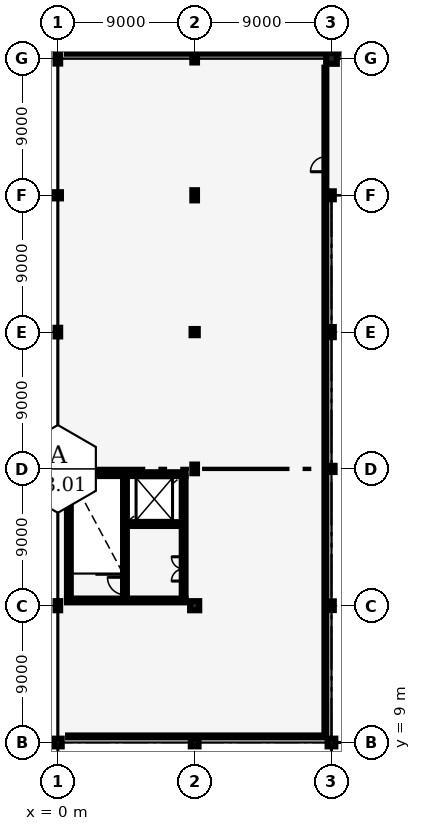
"""IFC4 building model, lengths in metres.
Left out: names, types, materials, properties, quantities, classifications, styles, units other than length and angle.
Written with IfcOpenShell. Run it as: python <this file> out.ifc"""

import sys

from ifc_helpers import new_model, si_unit, direction, frame, frame_2d, origin, origin_2d, place, context, subcontext, project, spatial, rectangle, hollow_circle, i_section, extrude, element, fill, save


model = new_model("IFC4")
c1 = context("Model", 3, precision=1e-05, world=origin(), true_north=direction((0.0, 1.0)))
c2 = subcontext(c1, "Body", "Model", "MODEL_VIEW")
j1 = project(units=[si_unit("LENGTHUNIT", "METRE"), si_unit("PLANEANGLEUNIT", "RADIAN")], contexts=[c1])
p1 = place(None, origin())
s1 = spatial("IfcSite", under=j1, at=p1, CompositionType="ELEMENT")
p2 = place(p1, origin())
s2 = spatial("IfcBuilding", under=s1, at=p2, CompositionType="ELEMENT")
p3 = place(p2, frame((0.0, 0.0, 12.0)))
s3 = spatial("IfcBuildingStorey", under=s2, at=p3, CompositionType="ELEMENT", Elevation=12.0)
p4 = place(p3, frame((0.0, 9.0, 0.0), z_axis=(0.0, 0.0, 1.0), x_axis=(1.0, 0.0, 0.0)))
e1 = element("IfcColumn", 1, at=p4, inside=s3, PredefinedType="COLUMN", context=c2, shape_type="SweptSolid", body=[
    extrude(hollow_circle(Radius=0.254, WallThickness=0.02, at=origin_2d()), origin(), (0.0, 0.0, 1.0), 6.0),
])
p5 = place(p3, frame((0.0, 18.0, 0.0), z_axis=(0.0, 0.0, 1.0), x_axis=(1.0, 0.0, 0.0)))
e2 = element("IfcColumn", 2, at=p5, inside=s3, PredefinedType="COLUMN", context=c2, shape_type="SweptSolid", body=[
    extrude(i_section(OverallWidth=0.3, OverallDepth=0.6, WebThickness=0.015, FlangeThickness=0.03, FilletRadius=0.027, at=origin_2d()), origin(), (0.0, 0.0, 1.0), 6.0),
])
p6 = place(p3, frame((0.0, 27.0, 0.0), z_axis=(0.0, 0.0, 1.0), x_axis=(1.0, 0.0, 0.0)))
e3 = element("IfcColumn", 3, at=p6, inside=s3, PredefinedType="COLUMN", context=c2, shape_type="SweptSolid", body=[
    extrude(rectangle(XDim=0.6, YDim=0.6, at=origin_2d()), origin(), (0.0, 0.0, 1.0), 6.0),
])
p7 = place(p3, frame((0.0, 36.0, 0.0), z_axis=(0.0, 0.0, 1.0), x_axis=(1.0, 0.0, 0.0)))
e4 = element("IfcColumn", 4, at=p7, inside=s3, PredefinedType="COLUMN", context=c2, shape_type="SweptSolid", body=[
    extrude(i_section(OverallWidth=0.306, OverallDepth=0.572, WebThickness=0.021, FlangeThickness=0.04, FilletRadius=0.027, at=origin_2d()), origin(), (0.0, 0.0, 1.0), 6.0),
])
p8 = place(p3, frame((0.0, 45.0, 0.0), z_axis=(0.0, 0.0, 1.0), x_axis=(1.0, 0.0, 0.0)))
e5 = element("IfcColumn", 5, at=p8, inside=s3, PredefinedType="COLUMN", context=c2, shape_type="SweptSolid", body=[
    extrude(hollow_circle(Radius=0.203, WallThickness=0.016, at=origin_2d()), origin(), (0.0, 0.0, 1.0), 6.0),
])
p9 = place(p3, frame((0.0, 54.0, 0.0), z_axis=(0.0, 0.0, 1.0), x_axis=(1.0, 0.0, 0.0)))
e6 = element("IfcColumn", 6, at=p9, inside=s3, PredefinedType="COLUMN", context=c2, shape_type="SweptSolid", body=[
    extrude(i_section(OverallWidth=0.305, OverallDepth=0.668, WebThickness=0.021, FlangeThickness=0.04, FilletRadius=0.027, at=origin_2d()), origin(), (0.0, 0.0, 1.0), 6.0),
])
p10 = place(p3, frame((9.0, 9.0, 0.0), z_axis=(0.0, 0.0, 1.0), x_axis=(1.0, 0.0, 0.0)))
e7 = element("IfcColumn", 7, at=p10, inside=s3, PredefinedType="COLUMN", context=c2, shape_type="SweptSolid", body=[
    extrude(hollow_circle(Radius=0.254, WallThickness=0.02, at=origin_2d()), origin(), (0.0, 0.0, 1.0), 6.0),
])
p11 = place(p3, frame((9.0, 18.0, 0.0), z_axis=(0.0, 0.0, 1.0), x_axis=(1.0, 0.0, 0.0)))
e8 = element("IfcColumn", 8, at=p11, inside=s3, PredefinedType="COLUMN", context=c2, shape_type="SweptSolid", body=[
    extrude(rectangle(XDim=0.6, YDim=0.6, at=origin_2d()), origin(), (0.0, 0.0, 1.0), 6.0),
])
p12 = place(p3, frame((9.0, 27.0, 0.0), z_axis=(0.0, 0.0, 1.0), x_axis=(1.0, 0.0, 0.0)))
e9 = element("IfcColumn", 9, at=p12, inside=s3, PredefinedType="COLUMN", context=c2, shape_type="SweptSolid", body=[
    extrude(i_section(OverallWidth=0.306, OverallDepth=0.572, WebThickness=0.021, FlangeThickness=0.04, FilletRadius=0.027, at=origin_2d()), origin(), (0.0, 0.0, 1.0), 6.0),
])
p13 = place(p3, frame((9.0, 36.0, 0.0), z_axis=(0.0, 0.0, 1.0), x_axis=(1.0, 0.0, 0.0)))
e10 = element("IfcColumn", 10, at=p13, inside=s3, PredefinedType="COLUMN", context=c2, shape_type="SweptSolid", body=[
    extrude(hollow_circle(Radius=0.203, WallThickness=0.016, at=origin_2d()), origin(), (0.0, 0.0, 1.0), 6.0),
])
p14 = place(p3, frame((9.0, 45.0, 0.0), z_axis=(0.0, 0.0, 1.0), x_axis=(1.0, 0.0, 0.0)))
e11 = element("IfcColumn", 11, at=p14, inside=s3, PredefinedType="COLUMN", context=c2, shape_type="SweptSolid", body=[
    extrude(i_section(OverallWidth=0.305, OverallDepth=0.668, WebThickness=0.021, FlangeThickness=0.04, FilletRadius=0.027, at=origin_2d()), origin(), (0.0, 0.0, 1.0), 6.0),
])
p15 = place(p3, frame((9.0, 54.0, 0.0), z_axis=(0.0, 0.0, 1.0), x_axis=(1.0, 0.0, 0.0)))
e12 = element("IfcColumn", 12, at=p15, inside=s3, PredefinedType="COLUMN", context=c2, shape_type="SweptSolid", body=[
    extrude(i_section(OverallWidth=0.306, OverallDepth=0.524, WebThickness=0.021, FlangeThickness=0.04, FilletRadius=0.027, at=origin_2d()), origin(), (0.0, 0.0, 1.0), 6.0),
])
p16 = place(p3, frame((18.0, 9.0, 0.0), z_axis=(0.0, 0.0, 1.0), x_axis=(1.0, 0.0, 0.0)))
e13 = element("IfcColumn", 13, at=p16, inside=s3, PredefinedType="COLUMN", context=c2, shape_type="SweptSolid", body=[
    extrude(hollow_circle(Radius=0.254, WallThickness=0.02, at=origin_2d()), origin(), (0.0, 0.0, 1.0), 6.0),
])
p17 = place(p3, frame((18.0, 18.0, 0.0), z_axis=(0.0, 0.0, 1.0), x_axis=(1.0, 0.0, 0.0)))
e14 = element("IfcColumn", 14, at=p17, inside=s3, PredefinedType="COLUMN", context=c2, shape_type="SweptSolid", body=[
    extrude(i_section(OverallWidth=0.306, OverallDepth=0.572, WebThickness=0.021, FlangeThickness=0.04, FilletRadius=0.027, at=origin_2d()), origin(), (0.0, 0.0, 1.0), 6.0),
])
p18 = place(p3, frame((18.0, 27.0, 0.0), z_axis=(0.0, 0.0, 1.0), x_axis=(1.0, 0.0, 0.0)))
e15 = element("IfcColumn", 15, at=p18, inside=s3, PredefinedType="COLUMN", context=c2, shape_type="SweptSolid", body=[
    extrude(hollow_circle(Radius=0.203, WallThickness=0.016, at=origin_2d()), origin(), (0.0, 0.0, 1.0), 6.0),
])
p19 = place(p3, frame((18.0, 36.0, 0.0), z_axis=(0.0, 0.0, 1.0), x_axis=(1.0, 0.0, 0.0)))
e16 = element("IfcColumn", 16, at=p19, inside=s3, PredefinedType="COLUMN", context=c2, shape_type="SweptSolid", body=[
    extrude(i_section(OverallWidth=0.305, OverallDepth=0.668, WebThickness=0.021, FlangeThickness=0.04, FilletRadius=0.027, at=origin_2d()), origin(), (0.0, 0.0, 1.0), 6.0),
])
p20 = place(p3, frame((18.0, 45.0, 0.0), z_axis=(0.0, 0.0, 1.0), x_axis=(1.0, 0.0, 0.0)))
e17 = element("IfcColumn", 17, at=p20, inside=s3, PredefinedType="COLUMN", context=c2, shape_type="SweptSolid", body=[
    extrude(i_section(OverallWidth=0.306, OverallDepth=0.524, WebThickness=0.021, FlangeThickness=0.04, FilletRadius=0.027, at=origin_2d()), origin(), (0.0, 0.0, 1.0), 6.0),
])
p21 = place(p3, frame((18.0, 54.0, 0.0), z_axis=(0.0, 0.0, 1.0), x_axis=(1.0, 0.0, 0.0)))
e18 = element("IfcColumn", 18, at=p21, inside=s3, PredefinedType="COLUMN", context=c2, shape_type="SweptSolid", body=[
    extrude(rectangle(XDim=0.7, YDim=0.7, at=origin_2d()), origin(), (0.0, 0.0, 1.0), 6.0),
])
p22 = place(p3, frame((0.725, 18.47, 0.0), z_axis=(0.0, 0.0, 1.0), x_axis=(0.0, 1.0, 0.0)))
e19 = element("IfcWall", 19, at=p22, inside=s3, PredefinedType="SHEAR", context=c2, shape_type="SweptSolid", body=[
    extrude(rectangle(XDim=8.06, YDim=0.25, at=frame_2d((4.03, 0.0))), origin(), (0.0, 0.0, 1.0), 5.64),
])
p23 = place(p3, frame((8.275, 18.47, 0.0), z_axis=(0.0, 0.0, 1.0), x_axis=(0.0, 1.0, 0.0)))
e20 = element("IfcWall", 20, at=p23, inside=s3, PredefinedType="SHEAR", context=c2, shape_type="SweptSolid", body=[
    extrude(rectangle(XDim=8.06, YDim=0.25, at=frame_2d((4.03, 0.0))), origin(), (0.0, 0.0, 1.0), 5.64),
])
p24 = place(p23, frame((1.15, 0.0, 0.0)))
e21 = element("IfcOpeningElement", 21, at=p24, cuts=e20, PredefinedType="OPENING", context=c2, shape_type="SweptSolid", body=[
    extrude(rectangle(XDim=1.6, YDim=2.2, at=frame_2d((0.8, 1.1))), frame((0.0, 0.135, 0.0), z_axis=(0.0, -1.0, 0.0), x_axis=(1.0, 0.0, 0.0)), (0.0, 0.0, 1.0), 0.27),
])
for number, where, z_axis, x_axis in (
    (22, (0.6, 18.345, 0.0), (0.0, 0.0, 1.0), (1.0, 0.0, 0.0)),
    (23, (0.6, 26.655, 0.0), (0.0, 0.0, 1.0), (1.0, 0.0, 0.0)),
):
    element("IfcWall", number, at=place(p3, frame(where, z_axis=z_axis, x_axis=x_axis)), inside=s3, PredefinedType="SHEAR", context=c2, shape_type="SweptSolid", body=[
        extrude(rectangle(XDim=7.8, YDim=0.25, at=frame_2d((3.9, 0.0))), origin(), (0.0, 0.0, 1.0), 5.64),
    ])
p25 = place(p3, frame((4.415, 18.47, 0.0), z_axis=(0.0, 0.0, 1.0), x_axis=(0.0, 1.0, 0.0)))
e24 = element("IfcWall", 24, at=p25, inside=s3, PredefinedType="SHEAR", context=c2, shape_type="SweptSolid", body=[
    extrude(rectangle(XDim=8.06, YDim=0.25, at=frame_2d((4.03, 0.0))), origin(), (0.0, 0.0, 1.0), 5.64),
])
p26 = place(p25, frame((0.25, 0.0, 0.0)))
e25 = element("IfcOpeningElement", 25, at=p26, cuts=e24, PredefinedType="OPENING", context=c2, shape_type="SweptSolid", body=[
    extrude(rectangle(XDim=1.15, YDim=2.15, at=frame_2d((0.575, 1.075))), frame((0.0, 0.135, 0.0), z_axis=(0.0, -1.0, 0.0), x_axis=(1.0, 0.0, 0.0)), (0.0, 0.0, 1.0), 0.27),
])
p27 = place(p3, frame((4.54, 23.37, 0.0), z_axis=(0.0, 0.0, 1.0), x_axis=(1.0, 0.0, 0.0)))
e26 = element("IfcWall", 26, at=p27, inside=s3, PredefinedType="SHEAR", context=c2, shape_type="SweptSolid", body=[
    extrude(rectangle(XDim=3.61, YDim=0.25, at=frame_2d((1.805, 0.0))), origin(), (0.0, 0.0, 1.0), 5.64),
])
p28 = place(p27, frame((0.5, 0.0, 0.0)))
e27 = element("IfcOpeningElement", 27, at=p28, cuts=e26, PredefinedType="OPENING", context=c2, shape_type="SweptSolid", body=[
    extrude(rectangle(XDim=2.2, YDim=2.4, at=frame_2d((1.1, 1.2))), frame((0.0, 0.135, 0.0), z_axis=(0.0, -1.0, 0.0), x_axis=(1.0, 0.0, 0.0)), (0.0, 0.0, 1.0), 0.27),
])
p29 = place(p3, frame((0.6, 54.4, 0.0), z_axis=(0.0, 0.0, 1.0), x_axis=(1.0, 0.0, 0.0)))
e28 = element("IfcWall", 28, at=p29, inside=s3, PredefinedType="PARTITIONING", context=c2, shape_type="SweptSolid", body=[
    extrude(rectangle(XDim=124.8, YDim=0.17, at=frame_2d((62.4, 0.0))), origin(), (0.0, 0.0, 1.0), 4.75),
])
p30 = place(p29, frame((0.85, 0.0, 0.0)))
e29 = element("IfcOpeningElement", 29, at=p30, cuts=e28, PredefinedType="OPENING", context=c2, shape_type="SweptSolid", body=[
    extrude(rectangle(XDim=1.02, YDim=2.15, at=frame_2d((0.51, 1.075))), frame((0.0, 0.095, 0.0), z_axis=(0.0, -1.0, 0.0), x_axis=(1.0, 0.0, 0.0)), (0.0, 0.0, 1.0), 0.19),
])
p31 = place(p3, frame((17.6, 9.4, 0.0), z_axis=(0.0, 0.0, 1.0), x_axis=(0.0, 1.0, 0.0)))
e30 = element("IfcWall", 30, at=p31, inside=s3, PredefinedType="PARTITIONING", context=c2, shape_type="SweptSolid", body=[
    extrude(rectangle(XDim=44.0, YDim=0.125, at=frame_2d((22.0, 0.0))), origin(), (0.0, 0.0, 1.0), 4.75),
])
p32 = place(p31, frame((37.15, 0.0, 0.0)))
e31 = element("IfcOpeningElement", 31, at=p32, cuts=e30, PredefinedType="OPENING", context=c2, shape_type="SweptSolid", body=[
    extrude(rectangle(XDim=0.98, YDim=2.12, at=frame_2d((0.49, 1.06))), frame((0.0, 0.073, 0.0), z_axis=(0.0, -1.0, 0.0), x_axis=(1.0, 0.0, 0.0)), (0.0, 0.0, 1.0), 0.145),
])
p33 = place(p3, frame((0.675, 9.4, 0.0), z_axis=(0.0, 0.0, 1.0), x_axis=(1.0, 0.0, 0.0)))
e32 = element("IfcWall", 32, at=p33, inside=s3, PredefinedType="PARTITIONING", context=c2, shape_type="SweptSolid", body=[
    extrude(rectangle(XDim=16.85, YDim=0.125, at=frame_2d((8.425, 0.0))), origin(), (0.0, 0.0, 1.0), 4.75),
])
p34 = place(p26, origin())
e33 = element("IfcDoor", 33, at=p34, inside=s3, OperationType="SINGLE_SWING_RIGHT", PredefinedType="DOOR", context=c2, shape_type="SweptSolid", body=[
    extrude(rectangle(XDim=1.15, YDim=2.15, at=frame_2d((0.575, 1.075))), frame((0.0, 0.025, 0.0), z_axis=(0.0, -1.0, 0.0), x_axis=(1.0, 0.0, 0.0)), (0.0, 0.0, 1.0), 0.05),
])
fill(e25, e33)
p35 = place(p28, origin())
e34 = element("IfcDoor", 34, at=p35, inside=s3, OperationType="DOUBLE_DOOR_SLIDING", PredefinedType="DOOR", context=c2, shape_type="SweptSolid", body=[
    extrude(rectangle(XDim=2.2, YDim=2.4, at=frame_2d((1.1, 1.2))), frame((0.0, 0.025, 0.0), z_axis=(0.0, -1.0, 0.0), x_axis=(1.0, 0.0, 0.0)), (0.0, 0.0, 1.0), 0.05),
])
fill(e27, e34)
p36 = place(p24, origin())
e35 = element("IfcDoor", 35, at=p36, inside=s3, OperationType="DOUBLE_DOOR_SINGLE_SWING", PredefinedType="DOOR", context=c2, shape_type="SweptSolid", body=[
    extrude(rectangle(XDim=1.6, YDim=2.2, at=frame_2d((0.8, 1.1))), frame((0.0, 0.025, 0.0), z_axis=(0.0, -1.0, 0.0), x_axis=(1.0, 0.0, 0.0)), (0.0, 0.0, 1.0), 0.05),
])
fill(e21, e35)
p37 = place(p30, origin())
e36 = element("IfcDoor", 36, at=p37, inside=s3, OperationType="SINGLE_SWING_RIGHT", PredefinedType="DOOR", context=c2, shape_type="SweptSolid", body=[
    extrude(rectangle(XDim=1.02, YDim=2.15, at=frame_2d((0.51, 1.075))), frame((0.0, 0.025, 0.0), z_axis=(0.0, -1.0, 0.0), x_axis=(1.0, 0.0, 0.0)), (0.0, 0.0, 1.0), 0.05),
])
fill(e29, e36)
p38 = place(p32, origin())
e37 = element("IfcDoor", 37, at=p38, inside=s3, OperationType="SINGLE_SWING_LEFT", PredefinedType="DOOR", context=c2, shape_type="SweptSolid", body=[
    extrude(rectangle(XDim=0.98, YDim=2.12, at=frame_2d((0.49, 1.06))), frame((0.0, 0.025, 0.0), z_axis=(0.0, -1.0, 0.0), x_axis=(1.0, 0.0, 0.0)), (0.0, 0.0, 1.0), 0.05),
])
fill(e31, e37)
save(model, sys.argv[1])
